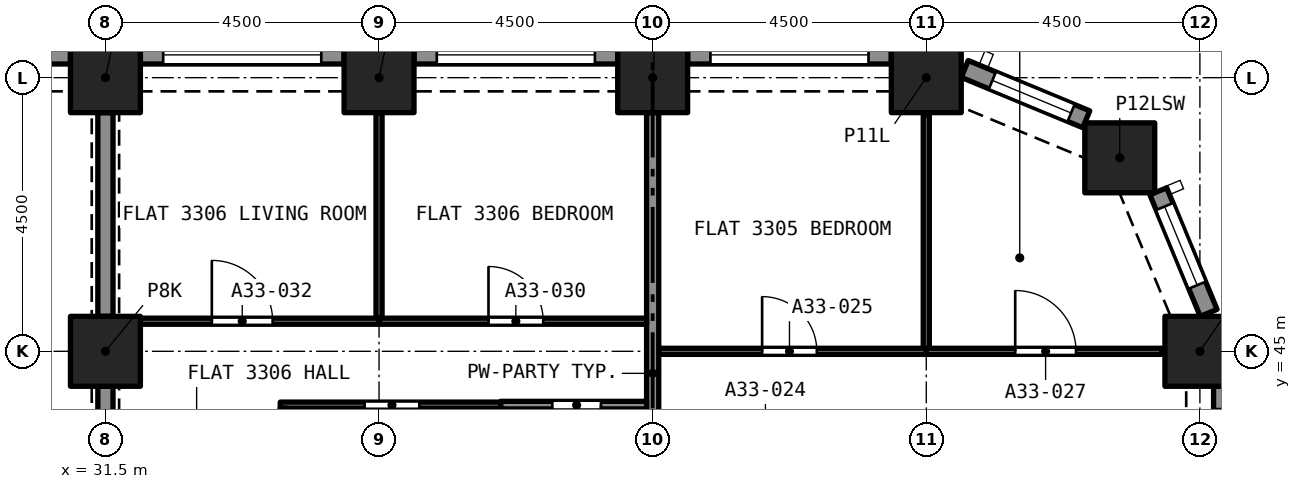
"""IFC4 building model, lengths in metres.
Left out: names, types, materials, properties, quantities, classifications, styles, units other than length and angle.
Written with IfcOpenShell. Run it as: python <this file> out.ifc"""

import sys

from ifc_helpers import new_model, si_unit, direction, frame, frame_2d, origin, origin_2d, place, context, subcontext, project, spatial, rectangle, extrude, element, fill, save


model = new_model("IFC4")
c1 = context("Model", 3, precision=1e-05, world=origin(), true_north=direction((0.0, 1.0)))
c2 = subcontext(c1, "Body", "Model", "MODEL_VIEW")
j1 = project(units=[si_unit("LENGTHUNIT", "METRE"), si_unit("PLANEANGLEUNIT", "RADIAN")], contexts=[c1])
p1 = place(None, origin())
s1 = spatial("IfcSite", under=j1, at=p1, CompositionType="ELEMENT")
p2 = place(p1, origin())
s2 = spatial("IfcBuilding", under=s1, at=p2, CompositionType="ELEMENT")
p3 = place(p2, frame((0.0, 0.0, 118.4)))
s3 = spatial("IfcBuildingStorey", under=s2, at=p3, CompositionType="ELEMENT", Elevation=118.4)
for number, where, z_axis, x_axis in (
    (1, (31.5, 45.0, 0.0), (0.0, 0.0, 1.0), (1.0, 0.0, 0.0)),
    (2, (49.5, 45.0, 0.0), (0.0, 0.0, 1.0), (1.0, 0.0, 0.0)),
    (3, (48.182, 48.182, 0.0), (0.0, 0.0, 1.0), (1.0, 0.0, 0.0)),
    (4, (31.5, 49.5, 0.0), (0.0, 0.0, 1.0), (1.0, 0.0, 0.0)),
    (5, (36.0, 49.5, 0.0), (0.0, 0.0, 1.0), (1.0, 0.0, 0.0)),
    (6, (40.5, 49.5, 0.0), (0.0, 0.0, 1.0), (1.0, 0.0, 0.0)),
    (7, (45.0, 49.5, 0.0), (0.0, 0.0, 1.0), (1.0, 0.0, 0.0)),
):
    element("IfcColumn", number, at=place(p3, frame(where, z_axis=z_axis, x_axis=x_axis)), inside=s3, PredefinedType="COLUMN", context=c2, shape_type="SweptSolid", body=[
        extrude(rectangle(XDim=1.15, YDim=1.15, at=origin_2d()), origin(), (0.0, 0.0, 1.0), 3.2),
    ])
p4 = place(p3, frame((49.875, 44.425, 0.0), z_axis=(0.0, 0.0, 1.0), x_axis=(0.0, -1.0, 0.0)))
e8 = element("IfcWall", 8, at=p4, inside=s3, PredefinedType="SOLIDWALL", context=c2, shape_type="SweptSolid", body=[
    extrude(rectangle(XDim=3.35, YDim=0.3, at=frame_2d((1.675, 0.0))), origin(), (0.0, 0.0, 1.0), 3.2),
])
p5 = place(p4, frame((0.375, 0.0, 0.45)))
e9 = element("IfcOpeningElement", 9, at=p5, cuts=e8, PredefinedType="OPENING", context=c2, shape_type="SweptSolid", body=[
    extrude(rectangle(XDim=2.6, YDim=1.95, at=frame_2d((1.3, 0.975))), frame((0.0, 0.16, 0.0), z_axis=(0.0, -1.0, 0.0), x_axis=(1.0, 0.0, 0.0)), (0.0, 0.0, 1.0), 0.32),
])
p6 = place(p3, frame((48.816, 47.631, 0.0), z_axis=(0.0, 0.0, 1.0), x_axis=(0.382723818695, -0.923862802911, 0.0)))
e10 = element("IfcWall", 10, at=p6, inside=s3, PredefinedType="SOLIDWALL", context=c2, shape_type="SweptSolid", body=[
    extrude(rectangle(XDim=2.164, YDim=0.3, at=frame_2d((1.082, 0.0))), origin(), (0.0, 0.0, 1.0), 3.2),
])
p7 = place(p6, frame((0.271, 0.0, 0.45)))
e11 = element("IfcOpeningElement", 11, at=p7, cuts=e10, PredefinedType="OPENING", context=c2, shape_type="SweptSolid", body=[
    extrude(rectangle(XDim=1.4, YDim=1.95, at=frame_2d((0.7, 0.975))), frame((0.0, 0.16, 0.0), z_axis=(0.0, -1.0, 0.0), x_axis=(1.0, 0.0, 0.0)), (0.0, 0.0, 1.0), 0.32),
])
p8 = place(p3, frame((45.632, 49.644, 0.0), z_axis=(0.0, 0.0, 1.0), x_axis=(0.923862802911, -0.382723818695, 0.0)))
e12 = element("IfcWall", 12, at=p8, inside=s3, PredefinedType="SOLIDWALL", context=c2, shape_type="SweptSolid", body=[
    extrude(rectangle(XDim=2.164, YDim=0.3, at=frame_2d((1.082, 0.0))), origin(), (0.0, 0.0, 1.0), 3.2),
])
p9 = place(p8, frame((0.493, 0.0, 0.45)))
e13 = element("IfcOpeningElement", 13, at=p9, cuts=e12, PredefinedType="OPENING", context=c2, shape_type="SweptSolid", body=[
    extrude(rectangle(XDim=1.4, YDim=1.95, at=frame_2d((0.7, 0.975))), frame((0.0, 0.16, 0.0), z_axis=(0.0, -1.0, 0.0), x_axis=(1.0, 0.0, 0.0)), (0.0, 0.0, 1.0), 0.32),
])
p10 = place(p3, frame((41.075, 49.875, 0.0), z_axis=(0.0, 0.0, 1.0), x_axis=(1.0, 0.0, 0.0)))
e14 = element("IfcWall", 14, at=p10, inside=s3, PredefinedType="SOLIDWALL", context=c2, shape_type="SweptSolid", body=[
    extrude(rectangle(XDim=3.35, YDim=0.3, at=frame_2d((1.675, 0.0))), origin(), (0.0, 0.0, 1.0), 3.2),
])
p11 = place(p10, frame((0.375, 0.0, 0.45)))
e15 = element("IfcOpeningElement", 15, at=p11, cuts=e14, PredefinedType="OPENING", context=c2, shape_type="SweptSolid", body=[
    extrude(rectangle(XDim=2.6, YDim=1.95, at=frame_2d((1.3, 0.975))), frame((0.0, 0.16, 0.0), z_axis=(0.0, -1.0, 0.0), x_axis=(1.0, 0.0, 0.0)), (0.0, 0.0, 1.0), 0.32),
])
p12 = place(p3, frame((36.575, 49.875, 0.0), z_axis=(0.0, 0.0, 1.0), x_axis=(1.0, 0.0, 0.0)))
e16 = element("IfcWall", 16, at=p12, inside=s3, PredefinedType="SOLIDWALL", context=c2, shape_type="SweptSolid", body=[
    extrude(rectangle(XDim=3.35, YDim=0.3, at=frame_2d((1.675, 0.0))), origin(), (0.0, 0.0, 1.0), 3.2),
])
p13 = place(p12, frame((0.375, 0.0, 0.45)))
e17 = element("IfcOpeningElement", 17, at=p13, cuts=e16, PredefinedType="OPENING", context=c2, shape_type="SweptSolid", body=[
    extrude(rectangle(XDim=2.6, YDim=1.95, at=frame_2d((1.3, 0.975))), frame((0.0, 0.16, 0.0), z_axis=(0.0, -1.0, 0.0), x_axis=(1.0, 0.0, 0.0)), (0.0, 0.0, 1.0), 0.32),
])
p14 = place(p3, frame((32.075, 49.875, 0.0), z_axis=(0.0, 0.0, 1.0), x_axis=(1.0, 0.0, 0.0)))
e18 = element("IfcWall", 18, at=p14, inside=s3, PredefinedType="SOLIDWALL", context=c2, shape_type="SweptSolid", body=[
    extrude(rectangle(XDim=3.35, YDim=0.3, at=frame_2d((1.675, 0.0))), origin(), (0.0, 0.0, 1.0), 3.2),
])
p15 = place(p14, frame((0.375, 0.0, 0.45)))
e19 = element("IfcOpeningElement", 19, at=p15, cuts=e18, PredefinedType="OPENING", context=c2, shape_type="SweptSolid", body=[
    extrude(rectangle(XDim=2.6, YDim=1.95, at=frame_2d((1.3, 0.975))), frame((0.0, 0.16, 0.0), z_axis=(0.0, -1.0, 0.0), x_axis=(1.0, 0.0, 0.0)), (0.0, 0.0, 1.0), 0.32),
])
p16 = place(p3, frame((27.575, 49.875, 0.0), z_axis=(0.0, 0.0, 1.0), x_axis=(1.0, 0.0, 0.0)))
e20 = element("IfcWall", 20, at=p16, inside=s3, PredefinedType="SOLIDWALL", context=c2, shape_type="SweptSolid", body=[
    extrude(rectangle(XDim=3.35, YDim=0.3, at=frame_2d((1.675, 0.0))), origin(), (0.0, 0.0, 1.0), 3.2),
])
p17 = place(p16, frame((0.375, 0.0, 0.45)))
e21 = element("IfcOpeningElement", 21, at=p17, cuts=e20, PredefinedType="OPENING", context=c2, shape_type="SweptSolid", body=[
    extrude(rectangle(XDim=2.6, YDim=1.95, at=frame_2d((1.3, 0.975))), frame((0.0, 0.16, 0.0), z_axis=(0.0, -1.0, 0.0), x_axis=(1.0, 0.0, 0.0)), (0.0, 0.0, 1.0), 0.32),
])
p18 = place(p3, frame((40.6, 45.0, 0.0), z_axis=(0.0, 0.0, 1.0), x_axis=(1.0, 0.0, 0.0)))
e22 = element("IfcWall", 22, at=p18, inside=s3, PredefinedType="PARTITIONING", context=c2, shape_type="SweptSolid", body=[
    extrude(rectangle(XDim=4.4, YDim=0.1, at=frame_2d((2.2, 0.0))), origin(), (0.0, 0.0, 1.0), 2.9),
])
p19 = place(p18, frame((1.7, 0.0, 0.0)))
e23 = element("IfcOpeningElement", 23, at=p19, cuts=e22, PredefinedType="OPENING", context=c2, shape_type="SweptSolid", body=[
    extrude(rectangle(XDim=0.9, YDim=2.1, at=frame_2d((0.45, 1.05))), frame((0.0, 0.06, 0.0), z_axis=(0.0, -1.0, 0.0), x_axis=(1.0, 0.0, 0.0)), (0.0, 0.0, 1.0), 0.12),
])
p20 = place(p3, frame((45.0, 45.05, 0.0), z_axis=(0.0, 0.0, 1.0), x_axis=(0.0, 1.0, 0.0)))
e24 = element("IfcWall", 24, at=p20, inside=s3, PredefinedType="PARTITIONING", context=c2, shape_type="SweptSolid", body=[
    extrude(rectangle(XDim=3.828, YDim=0.1, at=frame_2d((1.914, 0.0))), origin(), (0.0, 0.0, 1.0), 2.9),
])
p21 = place(p3, frame((45.0, 45.0, 0.0), z_axis=(0.0, 0.0, 1.0), x_axis=(1.0, 0.0, 0.0)))
e25 = element("IfcWall", 25, at=p21, inside=s3, PredefinedType="PARTITIONING", context=c2, shape_type="SweptSolid", body=[
    extrude(rectangle(XDim=3.878, YDim=0.1, at=frame_2d((1.939, 0.0))), origin(), (0.0, 0.0, 1.0), 2.9),
])
p22 = place(p21, frame((1.462, 0.0, 0.0)))
e26 = element("IfcOpeningElement", 26, at=p22, cuts=e25, PredefinedType="OPENING", context=c2, shape_type="SweptSolid", body=[
    extrude(rectangle(XDim=1.0, YDim=2.1, at=frame_2d((0.5, 1.05))), frame((0.0, 0.06, 0.0), z_axis=(0.0, -1.0, 0.0), x_axis=(1.0, 0.0, 0.0)), (0.0, 0.0, 1.0), 0.12),
])
p23 = place(p3, frame((40.5, 40.35, 0.0), z_axis=(0.0, 0.0, 1.0), x_axis=(0.0, 1.0, 0.0)))
e27 = element("IfcWall", 27, at=p23, inside=s3, PredefinedType="PARTITIONING", context=c2, shape_type="SweptSolid", body=[
    extrude(rectangle(XDim=8.575, YDim=0.2, at=frame_2d((4.288, 0.0))), origin(), (0.0, 0.0, 1.0), 2.9),
])
p24 = place(p3, frame((40.4, 44.115, 0.0), z_axis=(0.0, 0.0, 1.0), x_axis=(-1.0, 0.0, 0.0)))
e28 = element("IfcWall", 28, at=p24, inside=s3, PredefinedType="PARTITIONING", context=c2, shape_type="SweptSolid", body=[
    extrude(rectangle(XDim=2.4, YDim=0.125, at=frame_2d((1.2, 0.0))), origin(), (0.0, 0.0, 1.0), 2.9),
])
p25 = place(p24, frame((0.75, 0.0, 0.0)))
e29 = element("IfcOpeningElement", 29, at=p25, cuts=e28, PredefinedType="OPENING", context=c2, shape_type="SweptSolid", body=[
    extrude(rectangle(XDim=0.8, YDim=2.1, at=frame_2d((0.4, 1.05))), frame((0.0, 0.073, 0.0), z_axis=(0.0, -1.0, 0.0), x_axis=(1.0, 0.0, 0.0)), (0.0, 0.0, 1.0), 0.145),
])
p26 = place(p3, frame((38.0, 40.35, 0.0), z_axis=(0.0, 0.0, 1.0), x_axis=(0.0, 1.0, 0.0)))
e30 = element("IfcWall", 30, at=p26, inside=s3, PredefinedType="PARTITIONING", context=c2, shape_type="SweptSolid", body=[
    extrude(rectangle(XDim=3.702, YDim=0.125, at=frame_2d((1.851, 0.0))), origin(), (0.0, 0.0, 1.0), 2.9),
])
p27 = place(p3, frame((36.0, 45.495, 0.0), z_axis=(0.0, 0.0, 1.0), x_axis=(1.0, 0.0, 0.0)))
e31 = element("IfcWall", 31, at=p27, inside=s3, PredefinedType="PARTITIONING", context=c2, shape_type="SweptSolid", body=[
    extrude(rectangle(XDim=4.4, YDim=0.1, at=frame_2d((2.2, 0.0))), origin(), (0.0, 0.0, 1.0), 2.9),
])
p28 = place(p27, frame((1.8, 0.0, 0.0)))
e32 = element("IfcOpeningElement", 32, at=p28, cuts=e31, PredefinedType="OPENING", context=c2, shape_type="SweptSolid", body=[
    extrude(rectangle(XDim=0.9, YDim=2.1, at=frame_2d((0.45, 1.05))), frame((0.0, 0.06, 0.0), z_axis=(0.0, -1.0, 0.0), x_axis=(1.0, 0.0, 0.0)), (0.0, 0.0, 1.0), 0.12),
])
p29 = place(p3, frame((36.0, 45.545, 0.0), z_axis=(0.0, 0.0, 1.0), x_axis=(0.0, 1.0, 0.0)))
e33 = element("IfcWall", 33, at=p29, inside=s3, PredefinedType="PARTITIONING", context=c2, shape_type="SweptSolid", body=[
    extrude(rectangle(XDim=3.38, YDim=0.1, at=frame_2d((1.69, 0.0))), origin(), (0.0, 0.0, 1.0), 2.9),
])
p30 = place(p3, frame((38.0, 44.115, 0.0), z_axis=(0.0, 0.0, 1.0), x_axis=(-1.0, 0.0, 0.0)))
e34 = element("IfcWall", 34, at=p30, inside=s3, PredefinedType="PARTITIONING", context=c2, shape_type="SweptSolid", body=[
    extrude(rectangle(XDim=3.625, YDim=0.1, at=frame_2d((1.812, 0.0))), origin(), (0.0, 0.0, 1.0), 2.9),
])
p31 = place(p30, frame((1.337, 0.0, 0.0)))
e35 = element("IfcOpeningElement", 35, at=p31, cuts=e34, PredefinedType="OPENING", context=c2, shape_type="SweptSolid", body=[
    extrude(rectangle(XDim=0.9, YDim=2.1, at=frame_2d((0.45, 1.05))), frame((0.0, 0.06, 0.0), z_axis=(0.0, -1.0, 0.0), x_axis=(1.0, 0.0, 0.0)), (0.0, 0.0, 1.0), 0.12),
])
p32 = place(p3, frame((34.425, 40.425, 0.0), z_axis=(0.0, 0.0, 1.0), x_axis=(0.0, 1.0, 0.0)))
e36 = element("IfcWall", 36, at=p32, inside=s3, PredefinedType="PARTITIONING", context=c2, shape_type="SweptSolid", body=[
    extrude(rectangle(XDim=3.64, YDim=0.1, at=frame_2d((1.82, 0.0))), origin(), (0.0, 0.0, 1.0), 2.9),
])
p33 = place(p3, frame((32.075, 45.495, 0.0), z_axis=(0.0, 0.0, 1.0), x_axis=(1.0, 0.0, 0.0)))
e37 = element("IfcWall", 37, at=p33, inside=s3, PredefinedType="PARTITIONING", context=c2, shape_type="SweptSolid", body=[
    extrude(rectangle(XDim=3.925, YDim=0.1, at=frame_2d((1.962, 0.0))), origin(), (0.0, 0.0, 1.0), 2.9),
])
p34 = place(p33, frame((1.175, 0.0, 0.0)))
e38 = element("IfcOpeningElement", 38, at=p34, cuts=e37, PredefinedType="OPENING", context=c2, shape_type="SweptSolid", body=[
    extrude(rectangle(XDim=1.0, YDim=2.1, at=frame_2d((0.5, 1.05))), frame((0.0, 0.06, 0.0), z_axis=(0.0, -1.0, 0.0), x_axis=(1.0, 0.0, 0.0)), (0.0, 0.0, 1.0), 0.12),
])
for number, where, z_axis, x_axis in (
    (39, (31.5, 41.075, 0.0), (0.0, 0.0, 1.0), (0.0, 1.0, 0.0)),
    (40, (31.5, 45.575, 0.0), (0.0, 0.0, 1.0), (0.0, 1.0, 0.0)),
):
    element("IfcWall", number, at=place(p3, frame(where, z_axis=z_axis, x_axis=x_axis)), inside=s3, PredefinedType="PARTITIONING", context=c2, shape_type="SweptSolid", body=[
        extrude(rectangle(XDim=3.35, YDim=0.25, at=frame_2d((1.675, 0.0))), origin(), (0.0, 0.0, 1.0), 2.38),
    ])
p35 = place(p7, origin())
e41 = element("IfcWindow", 41, at=p35, inside=s3, PartitioningType="SINGLE_PANEL", PredefinedType="WINDOW", context=c2, shape_type="SweptSolid", body=[
    extrude(rectangle(XDim=1.4, YDim=1.95, at=frame_2d((0.7, 0.975))), frame((0.0, 0.03, 0.0), z_axis=(0.0, -1.0, 0.0), x_axis=(1.0, 0.0, 0.0)), (0.0, 0.0, 1.0), 0.06),
])
fill(e11, e41)
p36 = place(p9, origin())
e42 = element("IfcWindow", 42, at=p36, inside=s3, PartitioningType="SINGLE_PANEL", PredefinedType="WINDOW", context=c2, shape_type="SweptSolid", body=[
    extrude(rectangle(XDim=1.4, YDim=1.95, at=frame_2d((0.7, 0.975))), frame((0.0, 0.03, 0.0), z_axis=(0.0, -1.0, 0.0), x_axis=(1.0, 0.0, 0.0)), (0.0, 0.0, 1.0), 0.06),
])
fill(e13, e42)
p37 = place(p11, origin())
e43 = element("IfcWindow", 43, at=p37, inside=s3, PartitioningType="SINGLE_PANEL", PredefinedType="WINDOW", context=c2, shape_type="SweptSolid", body=[
    extrude(rectangle(XDim=2.6, YDim=1.95, at=frame_2d((1.3, 0.975))), frame((0.0, 0.03, 0.0), z_axis=(0.0, -1.0, 0.0), x_axis=(1.0, 0.0, 0.0)), (0.0, 0.0, 1.0), 0.06),
])
fill(e15, e43)
p38 = place(p13, origin())
e44 = element("IfcWindow", 44, at=p38, inside=s3, PartitioningType="SINGLE_PANEL", PredefinedType="WINDOW", context=c2, shape_type="SweptSolid", body=[
    extrude(rectangle(XDim=2.6, YDim=1.95, at=frame_2d((1.3, 0.975))), frame((0.0, 0.03, 0.0), z_axis=(0.0, -1.0, 0.0), x_axis=(1.0, 0.0, 0.0)), (0.0, 0.0, 1.0), 0.06),
])
fill(e17, e44)
p39 = place(p15, origin())
e45 = element("IfcWindow", 45, at=p39, inside=s3, PartitioningType="SINGLE_PANEL", PredefinedType="WINDOW", context=c2, shape_type="SweptSolid", body=[
    extrude(rectangle(XDim=2.6, YDim=1.95, at=frame_2d((1.3, 0.975))), frame((0.0, 0.03, 0.0), z_axis=(0.0, -1.0, 0.0), x_axis=(1.0, 0.0, 0.0)), (0.0, 0.0, 1.0), 0.06),
])
fill(e19, e45)
p40 = place(p19, origin())
e46 = element("IfcDoor", 46, at=p40, inside=s3, OperationType="SINGLE_SWING_LEFT", PredefinedType="DOOR", context=c2, shape_type="SweptSolid", body=[
    extrude(rectangle(XDim=0.9, YDim=2.1, at=frame_2d((0.45, 1.05))), frame((0.0, 0.025, 0.0), z_axis=(0.0, -1.0, 0.0), x_axis=(1.0, 0.0, 0.0)), (0.0, 0.0, 1.0), 0.05),
])
fill(e23, e46)
p41 = place(p22, origin())
e47 = element("IfcDoor", 47, at=p41, inside=s3, OperationType="SINGLE_SWING_RIGHT", PredefinedType="DOOR", context=c2, shape_type="SweptSolid", body=[
    extrude(rectangle(XDim=1.0, YDim=2.1, at=frame_2d((0.5, 1.05))), frame((0.0, 0.025, 0.0), z_axis=(0.0, -1.0, 0.0), x_axis=(1.0, 0.0, 0.0)), (0.0, 0.0, 1.0), 0.05),
])
fill(e26, e47)
p42 = place(p25, origin())
e48 = element("IfcDoor", 48, at=p42, inside=s3, OperationType="SINGLE_SWING_LEFT", PredefinedType="DOOR", context=c2, shape_type="SweptSolid", body=[
    extrude(rectangle(XDim=0.8, YDim=2.1, at=frame_2d((0.4, 1.05))), frame((0.0, 0.025, 0.0), z_axis=(0.0, -1.0, 0.0), x_axis=(1.0, 0.0, 0.0)), (0.0, 0.0, 1.0), 0.05),
])
fill(e29, e48)
p43 = place(p28, origin())
e49 = element("IfcDoor", 49, at=p43, inside=s3, OperationType="SINGLE_SWING_RIGHT", PredefinedType="DOOR", context=c2, shape_type="SweptSolid", body=[
    extrude(rectangle(XDim=0.9, YDim=2.1, at=frame_2d((0.45, 1.05))), frame((0.0, 0.025, 0.0), z_axis=(0.0, -1.0, 0.0), x_axis=(1.0, 0.0, 0.0)), (0.0, 0.0, 1.0), 0.05),
])
fill(e32, e49)
p44 = place(p31, origin())
e50 = element("IfcDoor", 50, at=p44, inside=s3, OperationType="SINGLE_SWING_LEFT", PredefinedType="DOOR", context=c2, shape_type="SweptSolid", body=[
    extrude(rectangle(XDim=0.9, YDim=2.1, at=frame_2d((0.45, 1.05))), frame((0.0, 0.025, 0.0), z_axis=(0.0, -1.0, 0.0), x_axis=(1.0, 0.0, 0.0)), (0.0, 0.0, 1.0), 0.05),
])
fill(e35, e50)
p45 = place(p34, origin())
e51 = element("IfcDoor", 51, at=p45, inside=s3, OperationType="SINGLE_SWING_LEFT", PredefinedType="DOOR", context=c2, shape_type="SweptSolid", body=[
    extrude(rectangle(XDim=1.0, YDim=2.1, at=frame_2d((0.5, 1.05))), frame((0.0, 0.025, 0.0), z_axis=(0.0, -1.0, 0.0), x_axis=(1.0, 0.0, 0.0)), (0.0, 0.0, 1.0), 0.05),
])
fill(e38, e51)
save(model, sys.argv[1])
